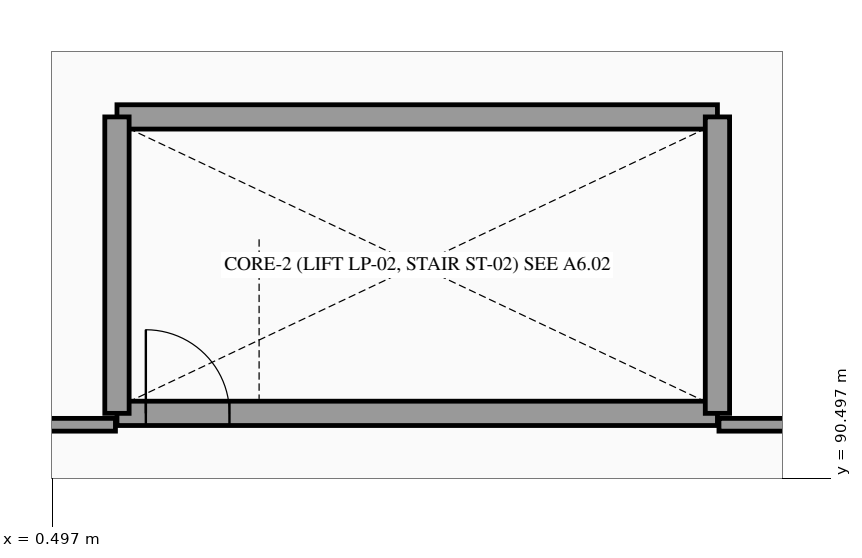
"""IFC4 building model, lengths in metres.
Left out: names, types, materials, properties, quantities, classifications, styles, units other than length and angle.
Written with IfcOpenShell. Run it as: python <this file> out.ifc"""

import sys

from ifc_helpers import new_model, si_unit, direction, frame, frame_2d, origin, place, context, subcontext, project, spatial, rectangle, extrude, element, fill, save


model = new_model("IFC4")
c1 = context("Model", 3, precision=1e-05, world=origin(), true_north=direction((0.0, 1.0)))
c2 = subcontext(c1, "Body", "Model", "MODEL_VIEW")
j1 = project(units=[si_unit("LENGTHUNIT", "METRE"), si_unit("PLANEANGLEUNIT", "RADIAN")], contexts=[c1])
p1 = place(None, origin())
s1 = spatial("IfcSite", under=j1, at=p1, CompositionType="ELEMENT")
p2 = place(p1, origin())
s2 = spatial("IfcBuilding", under=s1, at=p2, CompositionType="ELEMENT")
p3 = place(p2, frame((0.0, 0.0, 5.4)))
s3 = spatial("IfcBuildingStorey", under=s2, at=p3, CompositionType="ELEMENT", Elevation=5.4)
p4 = place(p3, frame((1.35, 91.35, 0.0), z_axis=(0.0, 0.0, 1.0), x_axis=(1.0, 0.0, 0.0)))
e1 = element("IfcWall", 1, at=p4, inside=s3, PredefinedType="SHEAR", context=c2, shape_type="SweptSolid", body=[
    extrude(rectangle(XDim=7.9, YDim=0.32, at=frame_2d((3.95, 0.0))), origin(), (0.0, 0.0, 1.0), 4.68),
])
p5 = place(p4, frame((0.38, 0.0, 0.0)))
e2 = element("IfcOpeningElement", 2, at=p5, cuts=e1, PredefinedType="OPENING", context=c2, shape_type="SweptSolid", body=[
    extrude(rectangle(XDim=1.1, YDim=2.2, at=frame_2d((0.55, 1.1))), frame((0.0, 0.17, 0.0), z_axis=(0.0, -1.0, 0.0), x_axis=(1.0, 0.0, 0.0)), (0.0, 0.0, 1.0), 0.34),
])
p6 = place(p3, frame((1.35, 95.25, 0.0), z_axis=(0.0, 0.0, 1.0), x_axis=(1.0, 0.0, 0.0)))
e3 = element("IfcWall", 3, at=p6, inside=s3, PredefinedType="SHEAR", context=c2, shape_type="SweptSolid", body=[
    extrude(rectangle(XDim=7.9, YDim=0.32, at=frame_2d((3.95, 0.0))), origin(), (0.0, 0.0, 1.0), 4.68),
])
for number, where, z_axis, x_axis in (
    (4, (1.35, 91.35, 0.0), (0.0, 0.0, 1.0), (0.0, 1.0, 0.0)),
    (5, (9.25, 91.35, 0.0), (0.0, 0.0, 1.0), (0.0, 1.0, 0.0)),
):
    element("IfcWall", number, at=place(p3, frame(where, z_axis=z_axis, x_axis=x_axis)), inside=s3, PredefinedType="SHEAR", context=c2, shape_type="SweptSolid", body=[
        extrude(rectangle(XDim=3.9, YDim=0.32, at=frame_2d((1.95, 0.0))), origin(), (0.0, 0.0, 1.0), 4.68),
    ])
p7 = place(p3, frame((0.0, 91.2, 0.0), z_axis=(0.0, 0.0, 1.0), x_axis=(1.0, 0.0, 0.0)))
e6 = element("IfcWall", 6, at=p7, inside=s3, PredefinedType="PARTITIONING", context=c2, shape_type="SweptSolid", body=[
    extrude(rectangle(XDim=1.33, YDim=0.168, at=frame_2d((0.665, 0.0))), origin(), (0.0, 0.0, 1.0), 3.23),
])
p8 = place(p3, frame((9.27, 91.2, 0.0), z_axis=(0.0, 0.0, 1.0), x_axis=(1.0, 0.0, 0.0)))
e7 = element("IfcWall", 7, at=p8, inside=s3, PredefinedType="PARTITIONING", context=c2, shape_type="SweptSolid", body=[
    extrude(rectangle(XDim=5.41, YDim=0.168, at=frame_2d((2.705, 0.0))), origin(), (0.0, 0.0, 1.0), 3.23),
])
p9 = place(p5, frame((1.1, 0.0, 0.0), z_axis=(0.0, 0.0, 1.0), x_axis=(-1.0, 0.0, 0.0)))
e8 = element("IfcDoor", 8, at=p9, inside=s3, OperationType="SINGLE_SWING_LEFT", PredefinedType="DOOR", context=c2, shape_type="SweptSolid", body=[
    extrude(rectangle(XDim=1.1, YDim=2.2, at=frame_2d((0.55, 1.1))), frame((0.0, 0.025, 0.0), z_axis=(0.0, -1.0, 0.0), x_axis=(1.0, 0.0, 0.0)), (0.0, 0.0, 1.0), 0.05),
])
fill(e2, e8)
save(model, sys.argv[1])
